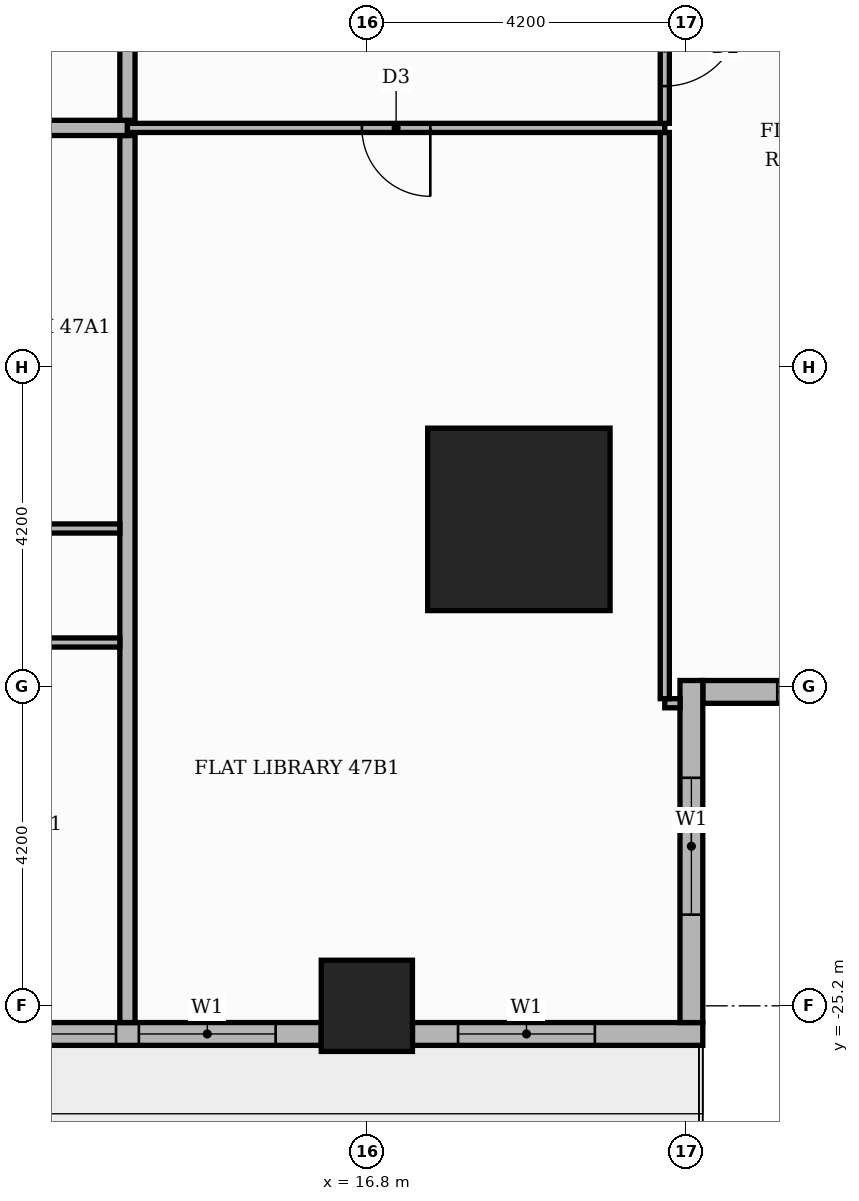
"""IFC4 building model, lengths in metres.
Left out: names, types, materials, properties, quantities, classifications, styles, units other than length and angle.
Written with IfcOpenShell. Run it as: python <this file> out.ifc"""

import sys

from ifc_helpers import new_model, si_unit, direction, frame, frame_2d, origin, origin_2d, place, context, subcontext, project, spatial, rectangle, extrude, element, fill, save


model = new_model("IFC4")
c1 = context("Model", 3, precision=1e-05, world=origin(), true_north=direction((0.0, 1.0)))
c2 = subcontext(c1, "Body", "Model", "MODEL_VIEW")
j1 = project(units=[si_unit("LENGTHUNIT", "METRE"), si_unit("PLANEANGLEUNIT", "RADIAN")], contexts=[c1])
p1 = place(None, origin())
s1 = spatial("IfcSite", under=j1, at=p1, CompositionType="ELEMENT")
p2 = place(p1, origin())
s2 = spatial("IfcBuilding", under=s1, at=p2, CompositionType="ELEMENT")
p3 = place(p2, frame((0.0, 0.0, 200.1)))
s3 = spatial("IfcBuildingStorey", under=s2, at=p3, CompositionType="ELEMENT", Elevation=200.1)
p4 = place(p3, frame((18.8, -18.8, 0.0), z_axis=(0.0, 0.0, 1.0), x_axis=(1.0, 0.0, 0.0)))
e1 = element("IfcColumn", 1, at=p4, inside=s3, PredefinedType="COLUMN", context=c2, shape_type="SweptSolid", body=[
    extrude(rectangle(XDim=2.4, YDim=2.4, at=origin_2d()), origin(), (0.0, 0.0, 1.0), 3.9),
])
p5 = place(p3, frame((16.8, -25.2, 0.0), z_axis=(0.0, 0.0, 1.0), x_axis=(1.0, 0.0, 0.0)))
e2 = element("IfcColumn", 2, at=p5, inside=s3, PredefinedType="COLUMN", context=c2, shape_type="SweptSolid", body=[
    extrude(rectangle(XDim=1.2, YDim=1.2, at=origin_2d()), origin(), (0.0, 0.0, 1.0), 3.9),
])
p6 = place(p3, frame((21.22, -21.07, 0.0), z_axis=(0.0, 0.0, 1.0), x_axis=(1.0, 0.0, 0.0)))
e3 = element("IfcWall", 3, at=p6, inside=s3, PredefinedType="STANDARD", context=c2, shape_type="SweptSolid", body=[
    extrude(rectangle(XDim=4.5, YDim=0.3, at=frame_2d((2.25, 0.0))), origin(), (0.0, 0.0, 1.0), 3.48),
])
p7 = place(p6, frame((0.98, 0.0, 0.9)))
e4 = element("IfcOpeningElement", 4, at=p7, cuts=e3, PredefinedType="OPENING", context=c2, shape_type="SweptSolid", body=[
    extrude(rectangle(XDim=1.8, YDim=2.1, at=frame_2d((0.9, 1.05))), frame((0.0, 0.16, 0.0), z_axis=(0.0, -1.0, 0.0), x_axis=(1.0, 0.0, 0.0)), (0.0, 0.0, 1.0), 0.32),
])
p8 = place(p3, frame((9.0, -25.57, 0.0), z_axis=(0.0, 0.0, 1.0), x_axis=(1.0, 0.0, 0.0)))
e5 = element("IfcWall", 5, at=p8, inside=s3, PredefinedType="STANDARD", context=c2, shape_type="SweptSolid", body=[
    extrude(rectangle(XDim=7.2, YDim=0.3, at=frame_2d((3.6, 0.0))), origin(), (0.0, 0.0, 1.0), 3.48),
])
p9 = place(p8, frame((0.6, 0.0, 0.9)))
e6 = element("IfcOpeningElement", 6, at=p9, cuts=e5, PredefinedType="OPENING", context=c2, shape_type="SweptSolid", body=[
    extrude(rectangle(XDim=3.9, YDim=2.1, at=frame_2d((1.95, 1.05))), frame((0.0, 0.16, 0.0), z_axis=(0.0, -1.0, 0.0), x_axis=(1.0, 0.0, 0.0)), (0.0, 0.0, 1.0), 0.32),
])
p10 = place(p8, frame((4.8, 0.0, 0.9)))
e7 = element("IfcOpeningElement", 7, at=p10, cuts=e5, PredefinedType="OPENING", context=c2, shape_type="SweptSolid", body=[
    extrude(rectangle(XDim=1.8, YDim=2.1, at=frame_2d((0.9, 1.05))), frame((0.0, 0.16, 0.0), z_axis=(0.0, -1.0, 0.0), x_axis=(1.0, 0.0, 0.0)), (0.0, 0.0, 1.0), 0.32),
])
p11 = place(p3, frame((17.4, -25.57, 0.0), z_axis=(0.0, 0.0, 1.0), x_axis=(1.0, 0.0, 0.0)))
e8 = element("IfcWall", 8, at=p11, inside=s3, PredefinedType="STANDARD", context=c2, shape_type="SweptSolid", body=[
    extrude(rectangle(XDim=3.82, YDim=0.3, at=frame_2d((1.91, 0.0))), origin(), (0.0, 0.0, 1.0), 3.48),
])
p12 = place(p11, frame((0.6, 0.0, 0.9)))
e9 = element("IfcOpeningElement", 9, at=p12, cuts=e8, PredefinedType="OPENING", context=c2, shape_type="SweptSolid", body=[
    extrude(rectangle(XDim=1.8, YDim=2.1, at=frame_2d((0.9, 1.05))), frame((0.0, 0.16, 0.0), z_axis=(0.0, -1.0, 0.0), x_axis=(1.0, 0.0, 0.0)), (0.0, 0.0, 1.0), 0.32),
])
p13 = place(p3, frame((21.07, -25.42, 0.0), z_axis=(0.0, 0.0, 1.0), x_axis=(0.0, 1.0, 0.0)))
e10 = element("IfcWall", 10, at=p13, inside=s3, PredefinedType="STANDARD", context=c2, shape_type="SweptSolid", body=[
    extrude(rectangle(XDim=4.5, YDim=0.3, at=frame_2d((2.25, 0.0))), origin(), (0.0, 0.0, 1.0), 3.48),
])
p14 = place(p13, frame((1.42, 0.0, 0.9)))
e11 = element("IfcOpeningElement", 11, at=p14, cuts=e10, PredefinedType="OPENING", context=c2, shape_type="SweptSolid", body=[
    extrude(rectangle(XDim=1.8, YDim=2.1, at=frame_2d((0.9, 1.05))), frame((0.0, 0.16, 0.0), z_axis=(0.0, -1.0, 0.0), x_axis=(1.0, 0.0, 0.0)), (0.0, 0.0, 1.0), 0.32),
])
p15 = place(p3, frame((13.65, -25.42, 0.0), z_axis=(0.0, 0.0, 1.0), x_axis=(0.0, 1.0, 0.0)))
e12 = element("IfcWall", 12, at=p15, inside=s3, PredefinedType="PARTITIONING", context=c2, shape_type="SweptSolid", body=[
    extrude(rectangle(XDim=11.67, YDim=0.2, at=frame_2d((5.835, 0.0))), origin(), (0.0, 0.0, 1.0), 3.48),
])
p16 = place(p3, frame((20.72, -21.219, 0.0), z_axis=(0.0, 0.0, 1.0), x_axis=(1.0, 0.0, 0.0)))
e13 = element("IfcWall", 13, at=p16, inside=s3, PredefinedType="PARTITIONING", context=c2, shape_type="SweptSolid", body=[
    extrude(rectangle(XDim=0.201, YDim=0.12, at=frame_2d((0.101, 0.0))), origin(), (0.0, 0.0, 1.0), 3.48),
])
p17 = place(p3, frame((20.72, -21.159, 0.0), z_axis=(0.0, 0.0, 1.0), x_axis=(0.0, 1.0, 0.0)))
e14 = element("IfcWall", 14, at=p17, inside=s3, PredefinedType="PARTITIONING", context=c2, shape_type="SweptSolid", body=[
    extrude(rectangle(XDim=7.449, YDim=0.12, at=frame_2d((3.725, 0.0))), origin(), (0.0, 0.0, 1.0), 3.48),
])
p18 = place(p3, frame((-21.219, -20.42, 0.0), z_axis=(0.0, 0.0, 1.0), x_axis=(1.0, 0.0, 0.0)))
e15 = element("IfcWall", 15, at=p18, inside=s3, PredefinedType="PARTITIONING", context=c2, shape_type="SweptSolid", body=[
    extrude(rectangle(XDim=34.769, YDim=0.12, at=frame_2d((17.385, 0.0))), origin(), (0.0, 0.0, 1.0), 3.48),
])
p19 = place(p18, frame((8.119, 0.0, 0.0)))
e16 = element("IfcOpeningElement", 16, at=p19, cuts=e15, PredefinedType="OPENING", context=c2, shape_type="SweptSolid", body=[
    extrude(rectangle(XDim=1.0, YDim=2.1, at=frame_2d((0.5, 1.05))), frame((0.0, 0.07, 0.0), z_axis=(0.0, -1.0, 0.0), x_axis=(1.0, 0.0, 0.0)), (0.0, 0.0, 1.0), 0.14),
])
p20 = place(p18, frame((13.419, 0.0, 0.0)))
e17 = element("IfcOpeningElement", 17, at=p20, cuts=e15, PredefinedType="OPENING", context=c2, shape_type="SweptSolid", body=[
    extrude(rectangle(XDim=0.9, YDim=2.1, at=frame_2d((0.45, 1.05))), frame((0.0, 0.07, 0.0), z_axis=(0.0, -1.0, 0.0), x_axis=(1.0, 0.0, 0.0)), (0.0, 0.0, 1.0), 0.14),
])
p21 = place(p18, frame((23.919, 0.0, 0.0)))
e18 = element("IfcOpeningElement", 18, at=p21, cuts=e15, PredefinedType="OPENING", context=c2, shape_type="SweptSolid", body=[
    extrude(rectangle(XDim=0.9, YDim=2.1, at=frame_2d((0.45, 1.05))), frame((0.0, 0.07, 0.0), z_axis=(0.0, -1.0, 0.0), x_axis=(1.0, 0.0, 0.0)), (0.0, 0.0, 1.0), 0.14),
])
p22 = place(p18, frame((31.269, 0.0, 0.0)))
e19 = element("IfcOpeningElement", 19, at=p22, cuts=e15, PredefinedType="OPENING", context=c2, shape_type="SweptSolid", body=[
    extrude(rectangle(XDim=0.9, YDim=2.1, at=frame_2d((0.45, 1.05))), frame((0.0, 0.07, 0.0), z_axis=(0.0, -1.0, 0.0), x_axis=(1.0, 0.0, 0.0)), (0.0, 0.0, 1.0), 0.14),
])
p23 = place(p3, frame((-7.35, -18.92, 0.0), z_axis=(0.0, 0.0, 1.0), x_axis=(1.0, 0.0, 0.0)))
e20 = element("IfcWall", 20, at=p23, inside=s3, PredefinedType="PARTITIONING", context=c2, shape_type="SweptSolid", body=[
    extrude(rectangle(XDim=20.9, YDim=0.12, at=frame_2d((10.45, 0.0))), origin(), (0.0, 0.0, 1.0), 3.48),
])
p24 = place(p23, frame((2.55, 0.0, 0.0)))
e21 = element("IfcOpeningElement", 21, at=p24, cuts=e20, PredefinedType="OPENING", context=c2, shape_type="SweptSolid", body=[
    extrude(rectangle(XDim=0.9, YDim=2.1, at=frame_2d((0.45, 1.05))), frame((0.0, 0.07, 0.0), z_axis=(0.0, -1.0, 0.0), x_axis=(1.0, 0.0, 0.0)), (0.0, 0.0, 1.0), 0.14),
])
p25 = place(p23, frame((7.5, 0.0, 0.0)))
e22 = element("IfcOpeningElement", 22, at=p25, cuts=e20, PredefinedType="OPENING", context=c2, shape_type="SweptSolid", body=[
    extrude(rectangle(XDim=0.9, YDim=2.1, at=frame_2d((0.45, 1.05))), frame((0.0, 0.07, 0.0), z_axis=(0.0, -1.0, 0.0), x_axis=(1.0, 0.0, 0.0)), (0.0, 0.0, 1.0), 0.14),
])
p26 = place(p23, frame((10.8, 0.0, 0.0)))
e23 = element("IfcOpeningElement", 23, at=p26, cuts=e20, PredefinedType="OPENING", context=c2, shape_type="SweptSolid", body=[
    extrude(rectangle(XDim=0.9, YDim=2.1, at=frame_2d((0.45, 1.05))), frame((0.0, 0.07, 0.0), z_axis=(0.0, -1.0, 0.0), x_axis=(1.0, 0.0, 0.0)), (0.0, 0.0, 1.0), 0.14),
])
p27 = place(p23, frame((13.275, 0.0, 0.0)))
e24 = element("IfcOpeningElement", 24, at=p27, cuts=e20, PredefinedType="OPENING", context=c2, shape_type="SweptSolid", body=[
    extrude(rectangle(XDim=0.9, YDim=2.1, at=frame_2d((0.45, 1.05))), frame((0.0, 0.07, 0.0), z_axis=(0.0, -1.0, 0.0), x_axis=(1.0, 0.0, 0.0)), (0.0, 0.0, 1.0), 0.14),
])
p28 = place(p23, frame((15.3, 0.0, 0.0)))
e25 = element("IfcOpeningElement", 25, at=p28, cuts=e20, PredefinedType="OPENING", context=c2, shape_type="SweptSolid", body=[
    extrude(rectangle(XDim=0.9, YDim=2.1, at=frame_2d((0.45, 1.05))), frame((0.0, 0.07, 0.0), z_axis=(0.0, -1.0, 0.0), x_axis=(1.0, 0.0, 0.0)), (0.0, 0.0, 1.0), 0.14),
])
p29 = place(p23, frame((18.375, 0.0, 0.0)))
e26 = element("IfcOpeningElement", 26, at=p29, cuts=e20, PredefinedType="OPENING", context=c2, shape_type="SweptSolid", body=[
    extrude(rectangle(XDim=0.9, YDim=2.1, at=frame_2d((0.45, 1.05))), frame((0.0, 0.07, 0.0), z_axis=(0.0, -1.0, 0.0), x_axis=(1.0, 0.0, 0.0)), (0.0, 0.0, 1.0), 0.14),
])
p30 = place(p3, frame((-25.42, -13.65, 0.0), z_axis=(0.0, 0.0, 1.0), x_axis=(1.0, 0.0, 0.0)))
e27 = element("IfcWall", 27, at=p30, inside=s3, PredefinedType="PARTITIONING", context=c2, shape_type="SweptSolid", body=[
    extrude(rectangle(XDim=39.07, YDim=0.2, at=frame_2d((19.535, 0.0))), origin(), (0.0, 0.0, 1.0), 3.48),
])
p31 = place(p30, frame((14.37, 0.0, 0.0)))
e28 = element("IfcOpeningElement", 28, at=p31, cuts=e27, PredefinedType="OPENING", context=c2, shape_type="SweptSolid", body=[
    extrude(rectangle(XDim=1.1, YDim=2.4, at=frame_2d((0.55, 1.2))), frame((0.0, 0.11, 0.0), z_axis=(0.0, -1.0, 0.0), x_axis=(1.0, 0.0, 0.0)), (0.0, 0.0, 1.0), 0.22),
])
p32 = place(p3, frame((13.65, -13.65, 0.0), z_axis=(0.0, 0.0, 1.0), x_axis=(1.0, 0.0, 0.0)))
e29 = element("IfcWall", 29, at=p32, inside=s3, PredefinedType="PARTITIONING", context=c2, shape_type="SweptSolid", body=[
    extrude(rectangle(XDim=7.07, YDim=0.12, at=frame_2d((3.535, 0.0))), origin(), (0.0, 0.0, 1.0), 3.48),
])
p33 = place(p32, frame((3.085, 0.0, 0.0)))
e30 = element("IfcOpeningElement", 30, at=p33, cuts=e29, PredefinedType="OPENING", context=c2, shape_type="SweptSolid", body=[
    extrude(rectangle(XDim=0.9, YDim=2.1, at=frame_2d((0.45, 1.05))), frame((0.0, 0.07, 0.0), z_axis=(0.0, -1.0, 0.0), x_axis=(1.0, 0.0, 0.0)), (0.0, 0.0, 1.0), 0.14),
])
p34 = place(p3, frame((20.72, -13.59, 0.0), z_axis=(0.0, 0.0, 1.0), x_axis=(0.0, 1.0, 0.0)))
e31 = element("IfcWall", 31, at=p34, inside=s3, PredefinedType="PARTITIONING", context=c2, shape_type="SweptSolid", body=[
    extrude(rectangle(XDim=1.98, YDim=0.12, at=frame_2d((0.99, 0.0))), origin(), (0.0, 0.0, 1.0), 3.48),
])
p35 = place(p34, frame((0.49, 0.0, 0.0)))
e32 = element("IfcOpeningElement", 32, at=p35, cuts=e31, PredefinedType="OPENING", context=c2, shape_type="SweptSolid", body=[
    extrude(rectangle(XDim=1.0, YDim=2.1, at=frame_2d((0.5, 1.05))), frame((0.0, 0.07, 0.0), z_axis=(0.0, -1.0, 0.0), x_axis=(1.0, 0.0, 0.0)), (0.0, 0.0, 1.0), 0.14),
])
p36 = place(p3, frame((13.65, -13.55, 0.0), z_axis=(0.0, 0.0, 1.0), x_axis=(0.0, 1.0, 0.0)))
e33 = element("IfcWall", 33, at=p36, inside=s3, PredefinedType="PARTITIONING", context=c2, shape_type="SweptSolid", body=[
    extrude(rectangle(XDim=2.45, YDim=0.2, at=frame_2d((1.225, 0.0))), origin(), (0.0, 0.0, 1.0), 3.48),
])
p37 = place(p7, origin())
e34 = element("IfcWindow", 34, at=p37, inside=s3, PartitioningType="SINGLE_PANEL", PredefinedType="WINDOW", context=c2, shape_type="SweptSolid", body=[
    extrude(rectangle(XDim=1.8, YDim=2.1, at=frame_2d((0.9, 1.05))), frame((0.0, 0.03, 0.0), z_axis=(0.0, -1.0, 0.0), x_axis=(1.0, 0.0, 0.0)), (0.0, 0.0, 1.0), 0.06),
])
fill(e4, e34)
p38 = place(p9, origin())
e35 = element("IfcWindow", 35, at=p38, inside=s3, PartitioningType="SINGLE_PANEL", PredefinedType="WINDOW", context=c2, shape_type="SweptSolid", body=[
    extrude(rectangle(XDim=3.9, YDim=2.1, at=frame_2d((1.95, 1.05))), frame((0.0, 0.03, 0.0), z_axis=(0.0, -1.0, 0.0), x_axis=(1.0, 0.0, 0.0)), (0.0, 0.0, 1.0), 0.06),
])
fill(e6, e35)
p39 = place(p10, origin())
e36 = element("IfcWindow", 36, at=p39, inside=s3, PartitioningType="SINGLE_PANEL", PredefinedType="WINDOW", context=c2, shape_type="SweptSolid", body=[
    extrude(rectangle(XDim=1.8, YDim=2.1, at=frame_2d((0.9, 1.05))), frame((0.0, 0.03, 0.0), z_axis=(0.0, -1.0, 0.0), x_axis=(1.0, 0.0, 0.0)), (0.0, 0.0, 1.0), 0.06),
])
fill(e7, e36)
p40 = place(p12, origin())
e37 = element("IfcWindow", 37, at=p40, inside=s3, PartitioningType="SINGLE_PANEL", PredefinedType="WINDOW", context=c2, shape_type="SweptSolid", body=[
    extrude(rectangle(XDim=1.8, YDim=2.1, at=frame_2d((0.9, 1.05))), frame((0.0, 0.03, 0.0), z_axis=(0.0, -1.0, 0.0), x_axis=(1.0, 0.0, 0.0)), (0.0, 0.0, 1.0), 0.06),
])
fill(e9, e37)
p41 = place(p14, origin())
e38 = element("IfcWindow", 38, at=p41, inside=s3, PartitioningType="SINGLE_PANEL", PredefinedType="WINDOW", context=c2, shape_type="SweptSolid", body=[
    extrude(rectangle(XDim=1.8, YDim=2.1, at=frame_2d((0.9, 1.05))), frame((0.0, 0.03, 0.0), z_axis=(0.0, -1.0, 0.0), x_axis=(1.0, 0.0, 0.0)), (0.0, 0.0, 1.0), 0.06),
])
fill(e11, e38)
p42 = place(p33, frame((0.9, 0.0, 0.0), z_axis=(0.0, 0.0, 1.0), x_axis=(-1.0, 0.0, 0.0)))
e39 = element("IfcDoor", 39, at=p42, inside=s3, OperationType="SINGLE_SWING_RIGHT", PredefinedType="DOOR", context=c2, shape_type="SweptSolid", body=[
    extrude(rectangle(XDim=0.9, YDim=2.1, at=frame_2d((0.45, 1.05))), frame((0.0, 0.025, 0.0), z_axis=(0.0, -1.0, 0.0), x_axis=(1.0, 0.0, 0.0)), (0.0, 0.0, 1.0), 0.05),
])
fill(e30, e39)
p43 = place(p35, frame((1.0, 0.0, 0.0), z_axis=(0.0, 0.0, 1.0), x_axis=(-1.0, 0.0, 0.0)))
e40 = element("IfcDoor", 40, at=p43, inside=s3, OperationType="SINGLE_SWING_RIGHT", PredefinedType="DOOR", context=c2, shape_type="SweptSolid", body=[
    extrude(rectangle(XDim=1.0, YDim=2.1, at=frame_2d((0.5, 1.05))), frame((0.0, 0.025, 0.0), z_axis=(0.0, -1.0, 0.0), x_axis=(1.0, 0.0, 0.0)), (0.0, 0.0, 1.0), 0.05),
])
fill(e32, e40)
save(model, sys.argv[1])
